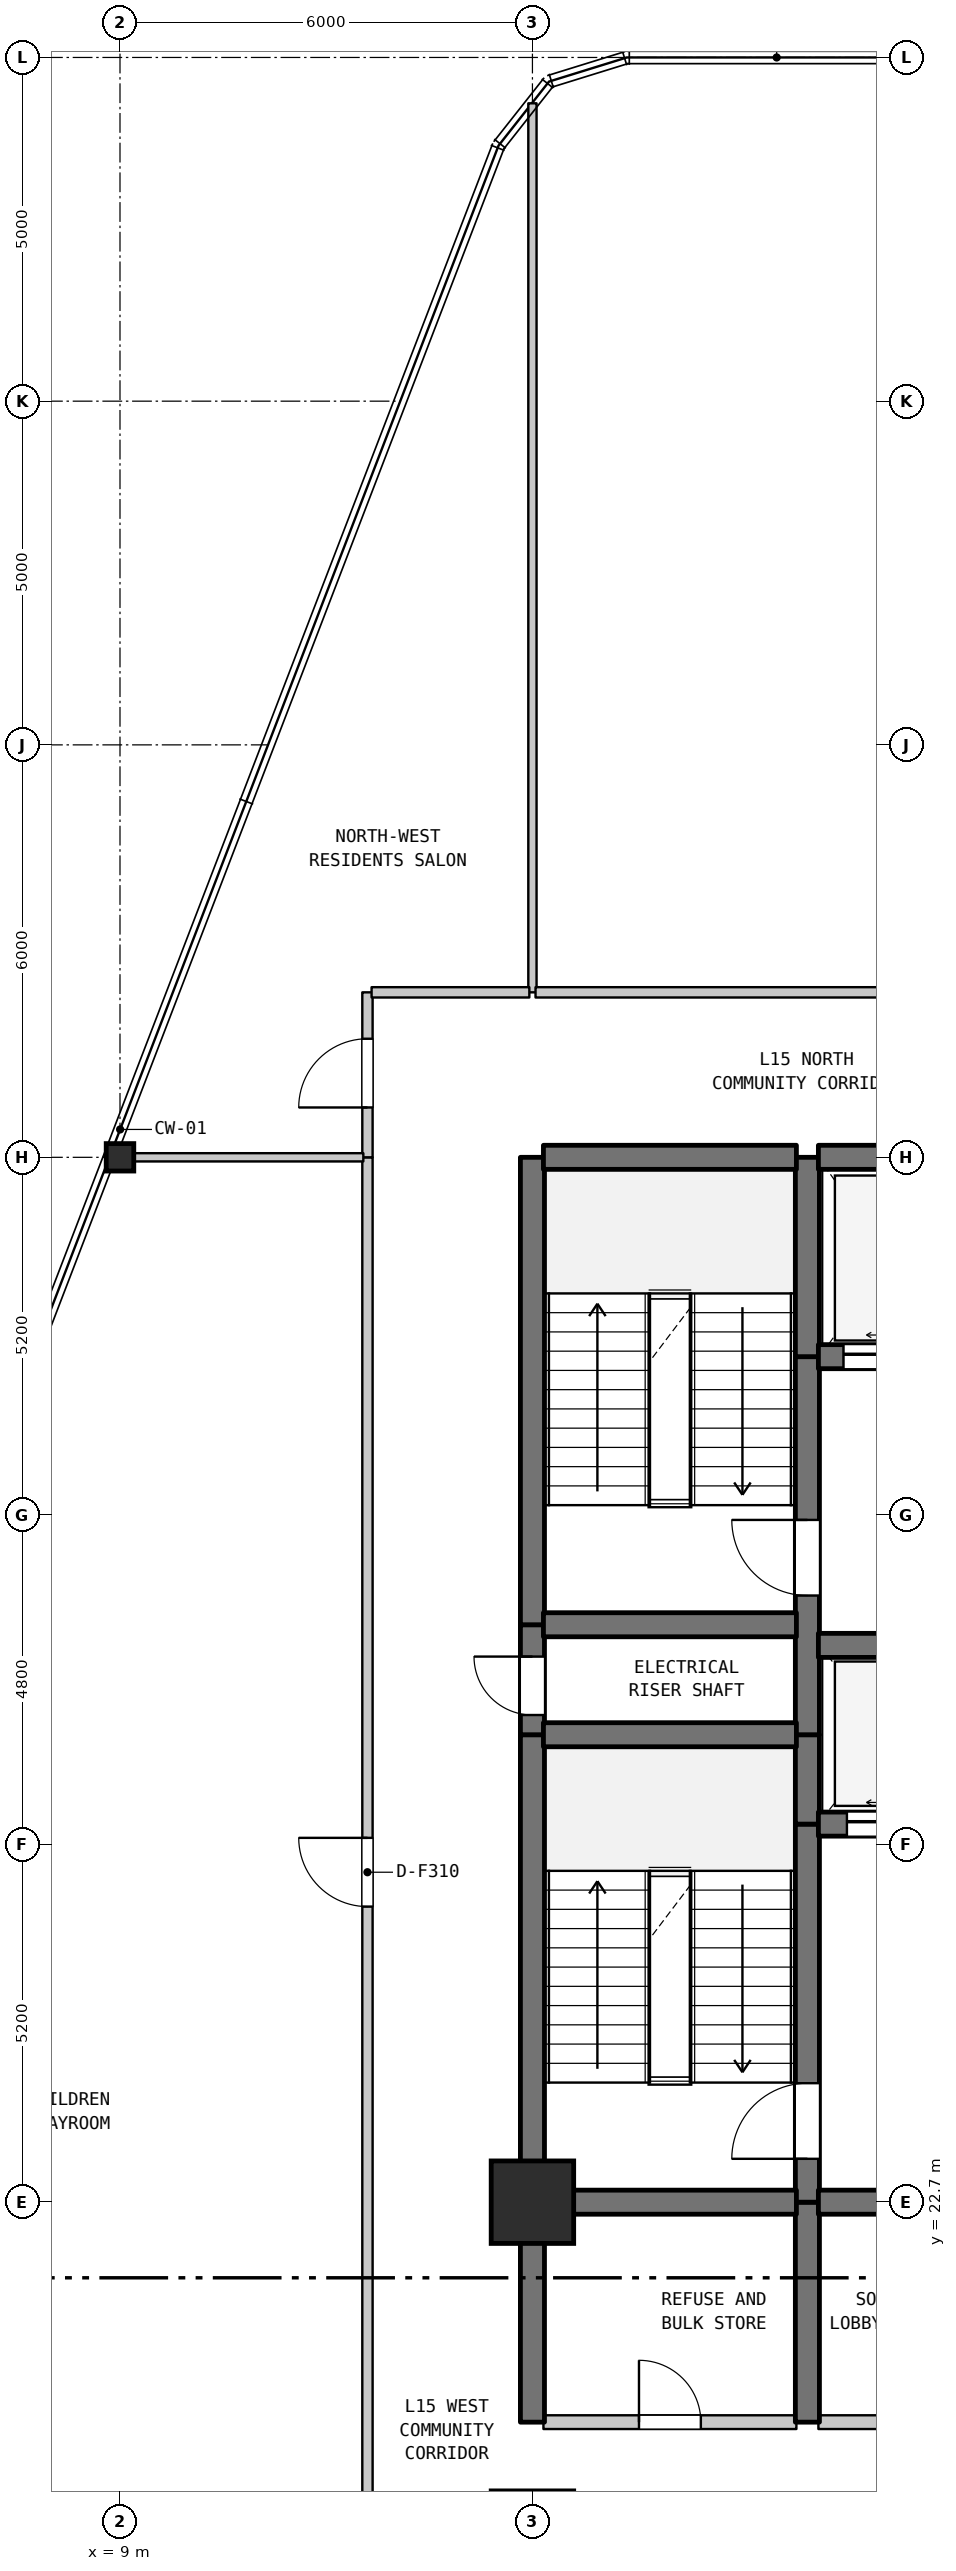
"""IFC4 building model, lengths in metres.
Left out: names, types, materials, properties, quantities, classifications, styles, units other than length and angle.
Written with IfcOpenShell. Run it as: python <this file> out.ifc"""

import sys

from ifc_helpers import new_model, si_unit, direction, frame, frame_2d, origin, origin_2d, place, context, subcontext, project, spatial, rectangle, i_section, extrude, element, fill, save


model = new_model("IFC4")
c1 = context("Model", 3, precision=1e-05, world=origin(), true_north=direction((0.0, 1.0)))
c2 = subcontext(c1, "Body", "Model", "MODEL_VIEW")
j1 = project(units=[si_unit("LENGTHUNIT", "METRE"), si_unit("PLANEANGLEUNIT", "RADIAN")], contexts=[c1])
p1 = place(None, origin())
s1 = spatial("IfcSite", under=j1, at=p1, CompositionType="ELEMENT")
p2 = place(p1, origin())
s2 = spatial("IfcBuilding", under=s1, at=p2, CompositionType="ELEMENT")
p3 = place(p2, frame((0.0, 0.0, 65.6)))
s3 = spatial("IfcBuildingStorey", under=s2, at=p3, CompositionType="ELEMENT", Elevation=65.6)
p4 = place(p3, frame((9.0, 37.9, 0.0), z_axis=(0.0, 0.0, 1.0), x_axis=(1.0, 0.0, 0.0)))
e1 = element("IfcColumn", 1, at=p4, inside=s3, PredefinedType="COLUMN", context=c2, shape_type="SweptSolid", body=[
    extrude(i_section(OverallWidth=0.401, OverallDepth=0.399, WebThickness=0.025, FlangeThickness=0.04, FilletRadius=0.015, at=origin_2d()), origin(), (0.0, 0.0, 1.0), 4.5),
])
p5 = place(p3, frame((15.0, 22.7, 0.0), z_axis=(0.0, 0.0, 1.0), x_axis=(1.0, 0.0, 0.0)))
e2 = element("IfcColumn", 2, at=p5, inside=s3, PredefinedType="COLUMN", context=c2, shape_type="SweptSolid", body=[
    extrude(rectangle(XDim=1.2, YDim=1.2, at=origin_2d()), origin(), (0.0, 0.0, 1.0), 4.5),
])
p6 = place(p3, frame((12.6, 17.9, 0.0), z_axis=(0.0, 0.0, 1.0), x_axis=(0.0, 1.0, 0.0)))
e3 = element("IfcWall", 3, at=p6, inside=s3, PredefinedType="STANDARD", context=c2, shape_type="SweptSolid", body=[
    extrude(rectangle(XDim=20.0, YDim=0.15, at=frame_2d((10.0, 0.0))), origin(), (0.0, 0.0, 1.0), 4.185),
])
p7 = place(p6, frame((9.1, 0.0, 0.0)))
e4 = element("IfcOpeningElement", 4, at=p7, cuts=e3, PredefinedType="OPENING", context=c2, shape_type="SweptSolid", body=[
    extrude(rectangle(XDim=1.0, YDim=2.15, at=frame_2d((0.5, 1.075))), frame((0.0, 0.085, 0.0), z_axis=(0.0, -1.0, 0.0), x_axis=(1.0, 0.0, 0.0)), (0.0, 0.0, 1.0), 0.17),
])
p8 = place(p3, frame((12.6, 37.9, 0.0), z_axis=(0.0, 0.0, 1.0), x_axis=(0.0, 1.0, 0.0)))
e5 = element("IfcWall", 5, at=p8, inside=s3, PredefinedType="STANDARD", context=c2, shape_type="SweptSolid", body=[
    extrude(rectangle(XDim=2.4, YDim=0.15, at=frame_2d((1.2, 0.0))), origin(), (0.0, 0.0, 1.0), 4.185),
])
p9 = place(p8, frame((0.725, 0.0, 0.0)))
e6 = element("IfcOpeningElement", 6, at=p9, cuts=e5, PredefinedType="OPENING", context=c2, shape_type="SweptSolid", body=[
    extrude(rectangle(XDim=1.0, YDim=2.15, at=frame_2d((0.5, 1.075))), frame((0.0, 0.085, 0.0), z_axis=(0.0, -1.0, 0.0), x_axis=(1.0, 0.0, 0.0)), (0.0, 0.0, 1.0), 0.17),
])
p10 = place(p3, frame((15.0, 19.5, 0.0), z_axis=(0.0, 0.0, 1.0), x_axis=(0.0, 1.0, 0.0)))
e7 = element("IfcWall", 7, at=p10, inside=s3, PredefinedType="SHEAR", context=c2, shape_type="SweptSolid", body=[
    extrude(rectangle(XDim=3.2, YDim=0.35, at=frame_2d((1.6, 0.0))), origin(), (0.0, 0.0, 1.0), 4.185),
])
p11 = place(p3, frame((15.0, 22.7, 0.0), z_axis=(0.0, 0.0, 1.0), x_axis=(0.0, 1.0, 0.0)))
e8 = element("IfcWall", 8, at=p11, inside=s3, PredefinedType="SHEAR", context=c2, shape_type="SweptSolid", body=[
    extrude(rectangle(XDim=6.8, YDim=0.35, at=frame_2d((3.4, 0.0))), origin(), (0.0, 0.0, 1.0), 4.185),
])
p12 = place(p3, frame((15.0, 29.5, 0.0), z_axis=(0.0, 0.0, 1.0), x_axis=(0.0, 1.0, 0.0)))
e9 = element("IfcWall", 9, at=p12, inside=s3, PredefinedType="SHEAR", context=c2, shape_type="SweptSolid", body=[
    extrude(rectangle(XDim=1.6, YDim=0.35, at=frame_2d((0.8, 0.0))), origin(), (0.0, 0.0, 1.0), 4.185),
])
p13 = place(p12, frame((0.287, 0.0, 0.0)))
e10 = element("IfcOpeningElement", 10, at=p13, cuts=e9, PredefinedType="OPENING", context=c2, shape_type="SweptSolid", body=[
    extrude(rectangle(XDim=0.85, YDim=2.1, at=frame_2d((0.425, 1.05))), frame((0.0, 0.185, 0.0), z_axis=(0.0, -1.0, 0.0), x_axis=(1.0, 0.0, 0.0)), (0.0, 0.0, 1.0), 0.37),
])
p14 = place(p3, frame((15.0, 31.1, 0.0), z_axis=(0.0, 0.0, 1.0), x_axis=(0.0, 1.0, 0.0)))
e11 = element("IfcWall", 11, at=p14, inside=s3, PredefinedType="SHEAR", context=c2, shape_type="SweptSolid", body=[
    extrude(rectangle(XDim=6.8, YDim=0.35, at=frame_2d((3.4, 0.0))), origin(), (0.0, 0.0, 1.0), 4.185),
])
p15 = place(p3, frame((15.0, 40.3, 0.0), z_axis=(0.0, 0.0, 1.0), x_axis=(0.0, 1.0, 0.0)))
e12 = element("IfcWall", 12, at=p15, inside=s3, PredefinedType="PARTITIONING", context=c2, shape_type="SweptSolid", body=[
    extrude(rectangle(XDim=12.933, YDim=0.12, at=frame_2d((6.466, 0.0))), origin(), (0.0, 0.0, 1.0), 4.185),
])
p16 = place(p3, frame((19.0, 19.5, 0.0), z_axis=(0.0, 0.0, 1.0), x_axis=(0.0, 1.0, 0.0)))
e13 = element("IfcWall", 13, at=p16, inside=s3, PredefinedType="SHEAR", context=c2, shape_type="SweptSolid", body=[
    extrude(rectangle(XDim=3.2, YDim=0.35, at=frame_2d((1.6, 0.0))), origin(), (0.0, 0.0, 1.0), 4.185),
])
p17 = place(p3, frame((19.0, 22.7, 0.0), z_axis=(0.0, 0.0, 1.0), x_axis=(0.0, 1.0, 0.0)))
e14 = element("IfcWall", 14, at=p17, inside=s3, PredefinedType="SHEAR", context=c2, shape_type="SweptSolid", body=[
    extrude(rectangle(XDim=5.5, YDim=0.35, at=frame_2d((2.75, 0.0))), origin(), (0.0, 0.0, 1.0), 4.185),
])
p18 = place(p17, frame((0.631, 0.0, 0.0)))
e15 = element("IfcOpeningElement", 15, at=p18, cuts=e14, PredefinedType="OPENING", context=c2, shape_type="SweptSolid", body=[
    extrude(rectangle(XDim=1.1, YDim=2.15, at=frame_2d((0.55, 1.075))), frame((0.0, 0.185, 0.0), z_axis=(0.0, -1.0, 0.0), x_axis=(1.0, 0.0, 0.0)), (0.0, 0.0, 1.0), 0.37),
])
p19 = place(p3, frame((19.0, 28.2, 0.0), z_axis=(0.0, 0.0, 1.0), x_axis=(0.0, 1.0, 0.0)))
e16 = element("IfcWall", 16, at=p19, inside=s3, PredefinedType="SHEAR", context=c2, shape_type="SweptSolid", body=[
    extrude(rectangle(XDim=1.3, YDim=0.35, at=frame_2d((0.65, 0.0))), origin(), (0.0, 0.0, 1.0), 4.185),
])
p20 = place(p3, frame((19.0, 29.5, 0.0), z_axis=(0.0, 0.0, 1.0), x_axis=(0.0, 1.0, 0.0)))
e17 = element("IfcWall", 17, at=p20, inside=s3, PredefinedType="SHEAR", context=c2, shape_type="SweptSolid", body=[
    extrude(rectangle(XDim=5.5, YDim=0.35, at=frame_2d((2.75, 0.0))), origin(), (0.0, 0.0, 1.0), 4.185),
])
p21 = place(p20, frame((2.025, 0.0, 0.0)))
e18 = element("IfcOpeningElement", 18, at=p21, cuts=e17, PredefinedType="OPENING", context=c2, shape_type="SweptSolid", body=[
    extrude(rectangle(XDim=1.1, YDim=2.15, at=frame_2d((0.55, 1.075))), frame((0.0, 0.185, 0.0), z_axis=(0.0, -1.0, 0.0), x_axis=(1.0, 0.0, 0.0)), (0.0, 0.0, 1.0), 0.37),
])
p22 = place(p3, frame((19.0, 35.0, 0.0), z_axis=(0.0, 0.0, 1.0), x_axis=(0.0, 1.0, 0.0)))
e19 = element("IfcWall", 19, at=p22, inside=s3, PredefinedType="SHEAR", context=c2, shape_type="SweptSolid", body=[
    extrude(rectangle(XDim=2.9, YDim=0.35, at=frame_2d((1.45, 0.0))), origin(), (0.0, 0.0, 1.0), 4.185),
])
p23 = place(p3, frame((15.16, 19.5, 0.0), z_axis=(0.0, 0.0, 1.0), x_axis=(1.0, 0.0, 0.0)))
e20 = element("IfcWall", 20, at=p23, inside=s3, PredefinedType="STANDARD", context=c2, shape_type="SweptSolid", body=[
    extrude(rectangle(XDim=3.68, YDim=0.2, at=frame_2d((1.84, 0.0))), origin(), (0.0, 0.0, 1.0), 4.185),
])
p24 = place(p23, frame((1.39, 0.0, 0.0)))
e21 = element("IfcOpeningElement", 21, at=p24, cuts=e20, PredefinedType="OPENING", context=c2, shape_type="SweptSolid", body=[
    extrude(rectangle(XDim=0.9, YDim=2.15, at=frame_2d((0.45, 1.075))), frame((0.0, 0.11, 0.0), z_axis=(0.0, -1.0, 0.0), x_axis=(1.0, 0.0, 0.0)), (0.0, 0.0, 1.0), 0.22),
])
p25 = place(p3, frame((19.16, 19.5, 0.0), z_axis=(0.0, 0.0, 1.0), x_axis=(1.0, 0.0, 0.0)))
e22 = element("IfcWall", 22, at=p25, inside=s3, PredefinedType="STANDARD", context=c2, shape_type="SweptSolid", body=[
    extrude(rectangle(XDim=4.48, YDim=0.2, at=frame_2d((2.24, 0.0))), origin(), (0.0, 0.0, 1.0), 4.185),
])
p26 = place(p25, frame((1.64, 0.0, 0.0)))
e23 = element("IfcOpeningElement", 23, at=p26, cuts=e22, PredefinedType="OPENING", context=c2, shape_type="SweptSolid", body=[
    extrude(rectangle(XDim=1.2, YDim=2.2, at=frame_2d((0.6, 1.1))), frame((0.0, 0.11, 0.0), z_axis=(0.0, -1.0, 0.0), x_axis=(1.0, 0.0, 0.0)), (0.0, 0.0, 1.0), 0.22),
])
p27 = place(p3, frame((15.16, 22.7, 0.0), z_axis=(0.0, 0.0, 1.0), x_axis=(1.0, 0.0, 0.0)))
e24 = element("IfcWall", 24, at=p27, inside=s3, PredefinedType="SHEAR", context=c2, shape_type="SweptSolid", body=[
    extrude(rectangle(XDim=3.68, YDim=0.35, at=frame_2d((1.84, 0.0))), origin(), (0.0, 0.0, 1.0), 4.185),
])
p28 = place(p3, frame((19.16, 22.7, 0.0), z_axis=(0.0, 0.0, 1.0), x_axis=(1.0, 0.0, 0.0)))
e25 = element("IfcWall", 25, at=p28, inside=s3, PredefinedType="SHEAR", context=c2, shape_type="SweptSolid", body=[
    extrude(rectangle(XDim=4.48, YDim=0.35, at=frame_2d((2.24, 0.0))), origin(), (0.0, 0.0, 1.0), 4.185),
])
p29 = place(p28, frame((1.64, 0.0, 0.0)))
e26 = element("IfcOpeningElement", 26, at=p29, cuts=e25, PredefinedType="OPENING", context=c2, shape_type="SweptSolid", body=[
    extrude(rectangle(XDim=1.2, YDim=2.2, at=frame_2d((0.6, 1.1))), frame((0.0, 0.185, 0.0), z_axis=(0.0, -1.0, 0.0), x_axis=(1.0, 0.0, 0.0)), (0.0, 0.0, 1.0), 0.37),
])
p30 = place(p3, frame((19.16, 28.2, 0.0), z_axis=(0.0, 0.0, 1.0), x_axis=(1.0, 0.0, 0.0)))
e27 = element("IfcWall", 27, at=p30, inside=s3, PredefinedType="SHEAR", context=c2, shape_type="SweptSolid", body=[
    extrude(rectangle(XDim=4.48, YDim=0.35, at=frame_2d((2.24, 0.0))), origin(), (0.0, 0.0, 1.0), 4.185),
])
p31 = place(p30, frame((0.415, 0.0, 0.0)))
e28 = element("IfcOpeningElement", 28, at=p31, cuts=e27, PredefinedType="OPENING", context=c2, shape_type="SweptSolid", body=[
    extrude(rectangle(XDim=1.25, YDim=2.2, at=frame_2d((0.625, 1.1))), frame((0.0, 0.185, 0.0), z_axis=(0.0, -1.0, 0.0), x_axis=(1.0, 0.0, 0.0)), (0.0, 0.0, 1.0), 0.37),
])
p32 = place(p30, frame((2.815, 0.0, 0.0)))
e29 = element("IfcOpeningElement", 29, at=p32, cuts=e27, PredefinedType="OPENING", context=c2, shape_type="SweptSolid", body=[
    extrude(rectangle(XDim=1.25, YDim=2.2, at=frame_2d((0.625, 1.1))), frame((0.0, 0.185, 0.0), z_axis=(0.0, -1.0, 0.0), x_axis=(1.0, 0.0, 0.0)), (0.0, 0.0, 1.0), 0.37),
])
p33 = place(p3, frame((15.16, 29.5, 0.0), z_axis=(0.0, 0.0, 1.0), x_axis=(1.0, 0.0, 0.0)))
e30 = element("IfcWall", 30, at=p33, inside=s3, PredefinedType="SHEAR", context=c2, shape_type="SweptSolid", body=[
    extrude(rectangle(XDim=3.68, YDim=0.35, at=frame_2d((1.84, 0.0))), origin(), (0.0, 0.0, 1.0), 4.185),
])
p34 = place(p3, frame((19.16, 30.8, 0.0), z_axis=(0.0, 0.0, 1.0), x_axis=(1.0, 0.0, 0.0)))
e31 = element("IfcWall", 31, at=p34, inside=s3, PredefinedType="SHEAR", context=c2, shape_type="SweptSolid", body=[
    extrude(rectangle(XDim=4.48, YDim=0.35, at=frame_2d((2.24, 0.0))), origin(), (0.0, 0.0, 1.0), 4.185),
])
p35 = place(p3, frame((15.16, 31.1, 0.0), z_axis=(0.0, 0.0, 1.0), x_axis=(1.0, 0.0, 0.0)))
e32 = element("IfcWall", 32, at=p35, inside=s3, PredefinedType="SHEAR", context=c2, shape_type="SweptSolid", body=[
    extrude(rectangle(XDim=3.68, YDim=0.35, at=frame_2d((1.84, 0.0))), origin(), (0.0, 0.0, 1.0), 4.185),
])
p36 = place(p3, frame((19.16, 35.0, 0.0), z_axis=(0.0, 0.0, 1.0), x_axis=(1.0, 0.0, 0.0)))
e33 = element("IfcWall", 33, at=p36, inside=s3, PredefinedType="SHEAR", context=c2, shape_type="SweptSolid", body=[
    extrude(rectangle(XDim=11.48, YDim=0.35, at=frame_2d((5.74, 0.0))), origin(), (0.0, 0.0, 1.0), 4.185),
])
p37 = place(p36, frame((0.365, 0.0, 0.0)))
e34 = element("IfcOpeningElement", 34, at=p37, cuts=e33, PredefinedType="OPENING", context=c2, shape_type="SweptSolid", body=[
    extrude(rectangle(XDim=1.35, YDim=2.2, at=frame_2d((0.675, 1.1))), frame((0.0, 0.185, 0.0), z_axis=(0.0, -1.0, 0.0), x_axis=(1.0, 0.0, 0.0)), (0.0, 0.0, 1.0), 0.37),
])
p38 = place(p36, frame((2.765, 0.0, 0.0)))
e35 = element("IfcOpeningElement", 35, at=p38, cuts=e33, PredefinedType="OPENING", context=c2, shape_type="SweptSolid", body=[
    extrude(rectangle(XDim=1.35, YDim=2.2, at=frame_2d((0.675, 1.1))), frame((0.0, 0.185, 0.0), z_axis=(0.0, -1.0, 0.0), x_axis=(1.0, 0.0, 0.0)), (0.0, 0.0, 1.0), 0.37),
])
p39 = place(p36, frame((4.915, 0.0, 0.0)))
e36 = element("IfcOpeningElement", 36, at=p39, cuts=e33, PredefinedType="OPENING", context=c2, shape_type="SweptSolid", body=[
    extrude(rectangle(XDim=1.2, YDim=2.2, at=frame_2d((0.6, 1.1))), frame((0.0, 0.185, 0.0), z_axis=(0.0, -1.0, 0.0), x_axis=(1.0, 0.0, 0.0)), (0.0, 0.0, 1.0), 0.37),
])
p40 = place(p36, frame((6.665, 0.0, 0.0)))
e37 = element("IfcOpeningElement", 37, at=p40, cuts=e33, PredefinedType="OPENING", context=c2, shape_type="SweptSolid", body=[
    extrude(rectangle(XDim=1.2, YDim=2.2, at=frame_2d((0.6, 1.1))), frame((0.0, 0.185, 0.0), z_axis=(0.0, -1.0, 0.0), x_axis=(1.0, 0.0, 0.0)), (0.0, 0.0, 1.0), 0.37),
])
p41 = place(p36, frame((8.415, 0.0, 0.0)))
e38 = element("IfcOpeningElement", 38, at=p41, cuts=e33, PredefinedType="OPENING", context=c2, shape_type="SweptSolid", body=[
    extrude(rectangle(XDim=1.2, YDim=2.2, at=frame_2d((0.6, 1.1))), frame((0.0, 0.185, 0.0), z_axis=(0.0, -1.0, 0.0), x_axis=(1.0, 0.0, 0.0)), (0.0, 0.0, 1.0), 0.37),
])
p42 = place(p36, frame((10.16, 0.0, 0.0)))
e39 = element("IfcOpeningElement", 39, at=p42, cuts=e33, PredefinedType="OPENING", context=c2, shape_type="SweptSolid", body=[
    extrude(rectangle(XDim=1.2, YDim=2.2, at=frame_2d((0.6, 1.1))), frame((0.0, 0.185, 0.0), z_axis=(0.0, -1.0, 0.0), x_axis=(1.0, 0.0, 0.0)), (0.0, 0.0, 1.0), 0.37),
])
p43 = place(p3, frame((8.856, 37.9, 0.0), z_axis=(0.0, 0.0, 1.0), x_axis=(1.0, 0.0, 0.0)))
e40 = element("IfcWall", 40, at=p43, inside=s3, PredefinedType="PARTITIONING", context=c2, shape_type="SweptSolid", body=[
    extrude(rectangle(XDim=3.684, YDim=0.12, at=frame_2d((1.842, 0.0))), origin(), (0.0, 0.0, 1.0), 3.685),
])
p44 = place(p3, frame((15.16, 37.9, 0.0), z_axis=(0.0, 0.0, 1.0), x_axis=(1.0, 0.0, 0.0)))
e41 = element("IfcWall", 41, at=p44, inside=s3, PredefinedType="SHEAR", context=c2, shape_type="SweptSolid", body=[
    extrude(rectangle(XDim=3.68, YDim=0.35, at=frame_2d((1.84, 0.0))), origin(), (0.0, 0.0, 1.0), 4.185),
])
p45 = place(p3, frame((19.16, 37.9, 0.0), z_axis=(0.0, 0.0, 1.0), x_axis=(1.0, 0.0, 0.0)))
e42 = element("IfcWall", 42, at=p45, inside=s3, PredefinedType="SHEAR", context=c2, shape_type="SweptSolid", body=[
    extrude(rectangle(XDim=11.48, YDim=0.35, at=frame_2d((5.74, 0.0))), origin(), (0.0, 0.0, 1.0), 4.185),
])
p46 = place(p3, frame((12.66, 40.3, 0.0), z_axis=(0.0, 0.0, 1.0), x_axis=(1.0, 0.0, 0.0)))
e43 = element("IfcWall", 43, at=p46, inside=s3, PredefinedType="STANDARD", context=c2, shape_type="SweptSolid", body=[
    extrude(rectangle(XDim=2.295, YDim=0.15, at=frame_2d((1.147, 0.0))), origin(), (0.0, 0.0, 1.0), 4.185),
])
p47 = place(p3, frame((15.045, 40.3, 0.0), z_axis=(0.0, 0.0, 1.0), x_axis=(1.0, 0.0, 0.0)))
e44 = element("IfcWall", 44, at=p47, inside=s3, PredefinedType="STANDARD", context=c2, shape_type="SweptSolid", body=[
    extrude(rectangle(XDim=17.895, YDim=0.15, at=frame_2d((8.948, 0.0))), origin(), (0.0, 0.0, 1.0), 4.185),
])
p48 = place(p47, frame((9.205, 0.0, 0.0)))
e45 = element("IfcOpeningElement", 45, at=p48, cuts=e44, PredefinedType="OPENING", context=c2, shape_type="SweptSolid", body=[
    extrude(rectangle(XDim=1.0, YDim=2.15, at=frame_2d((0.5, 1.075))), frame((0.0, 0.085, 0.0), z_axis=(0.0, -1.0, 0.0), x_axis=(1.0, 0.0, 0.0)), (0.0, 0.0, 1.0), 0.17),
])
p49 = place(p7, origin())
e46 = element("IfcDoor", 46, at=p49, inside=s3, OperationType="SINGLE_SWING_RIGHT", PredefinedType="DOOR", context=c2, shape_type="SweptSolid", body=[
    extrude(rectangle(XDim=1.0, YDim=2.15, at=frame_2d((0.5, 1.075))), frame((0.0, 0.025, 0.0), z_axis=(0.0, -1.0, 0.0), x_axis=(1.0, 0.0, 0.0)), (0.0, 0.0, 1.0), 0.05),
])
fill(e4, e46)
p50 = place(p9, origin())
e47 = element("IfcDoor", 47, at=p50, inside=s3, OperationType="SINGLE_SWING_LEFT", PredefinedType="DOOR", context=c2, shape_type="SweptSolid", body=[
    extrude(rectangle(XDim=1.0, YDim=2.15, at=frame_2d((0.5, 1.075))), frame((0.0, 0.025, 0.0), z_axis=(0.0, -1.0, 0.0), x_axis=(1.0, 0.0, 0.0)), (0.0, 0.0, 1.0), 0.05),
])
fill(e6, e47)
p51 = place(p13, origin())
e48 = element("IfcDoor", 48, at=p51, inside=s3, OperationType="SINGLE_SWING_RIGHT", PredefinedType="DOOR", context=c2, shape_type="SweptSolid", body=[
    extrude(rectangle(XDim=0.85, YDim=2.1, at=frame_2d((0.425, 1.05))), frame((0.0, 0.025, 0.0), z_axis=(0.0, -1.0, 0.0), x_axis=(1.0, 0.0, 0.0)), (0.0, 0.0, 1.0), 0.05),
])
fill(e10, e48)
p52 = place(p18, origin())
e49 = element("IfcDoor", 49, at=p52, inside=s3, OperationType="SINGLE_SWING_LEFT", PredefinedType="DOOR", context=c2, shape_type="SweptSolid", body=[
    extrude(rectangle(XDim=1.1, YDim=2.15, at=frame_2d((0.55, 1.075))), frame((0.0, 0.025, 0.0), z_axis=(0.0, -1.0, 0.0), x_axis=(1.0, 0.0, 0.0)), (0.0, 0.0, 1.0), 0.05),
])
fill(e15, e49)
p53 = place(p21, origin())
e50 = element("IfcDoor", 50, at=p53, inside=s3, OperationType="SINGLE_SWING_RIGHT", PredefinedType="DOOR", context=c2, shape_type="SweptSolid", body=[
    extrude(rectangle(XDim=1.1, YDim=2.15, at=frame_2d((0.55, 1.075))), frame((0.0, 0.025, 0.0), z_axis=(0.0, -1.0, 0.0), x_axis=(1.0, 0.0, 0.0)), (0.0, 0.0, 1.0), 0.05),
])
fill(e18, e50)
p54 = place(p24, origin())
e51 = element("IfcDoor", 51, at=p54, inside=s3, OperationType="SINGLE_SWING_LEFT", PredefinedType="DOOR", context=c2, shape_type="SweptSolid", body=[
    extrude(rectangle(XDim=0.9, YDim=2.15, at=frame_2d((0.45, 1.075))), frame((0.0, 0.025, 0.0), z_axis=(0.0, -1.0, 0.0), x_axis=(1.0, 0.0, 0.0)), (0.0, 0.0, 1.0), 0.05),
])
fill(e21, e51)
p55 = place(p31, origin())
e52 = element("IfcDoor", 52, at=p55, inside=s3, OperationType="DOUBLE_DOOR_SLIDING", PredefinedType="DOOR", context=c2, shape_type="SweptSolid", body=[
    extrude(rectangle(XDim=1.25, YDim=2.2, at=frame_2d((0.625, 1.1))), frame((0.0, 0.025, 0.0), z_axis=(0.0, -1.0, 0.0), x_axis=(1.0, 0.0, 0.0)), (0.0, 0.0, 1.0), 0.05),
])
fill(e28, e52)
p56 = place(p37, origin())
e53 = element("IfcDoor", 53, at=p56, inside=s3, OperationType="DOUBLE_DOOR_SLIDING", PredefinedType="DOOR", context=c2, shape_type="SweptSolid", body=[
    extrude(rectangle(XDim=1.35, YDim=2.2, at=frame_2d((0.675, 1.1))), frame((0.0, 0.025, 0.0), z_axis=(0.0, -1.0, 0.0), x_axis=(1.0, 0.0, 0.0)), (0.0, 0.0, 1.0), 0.05),
])
fill(e34, e53)
save(model, sys.argv[1])
